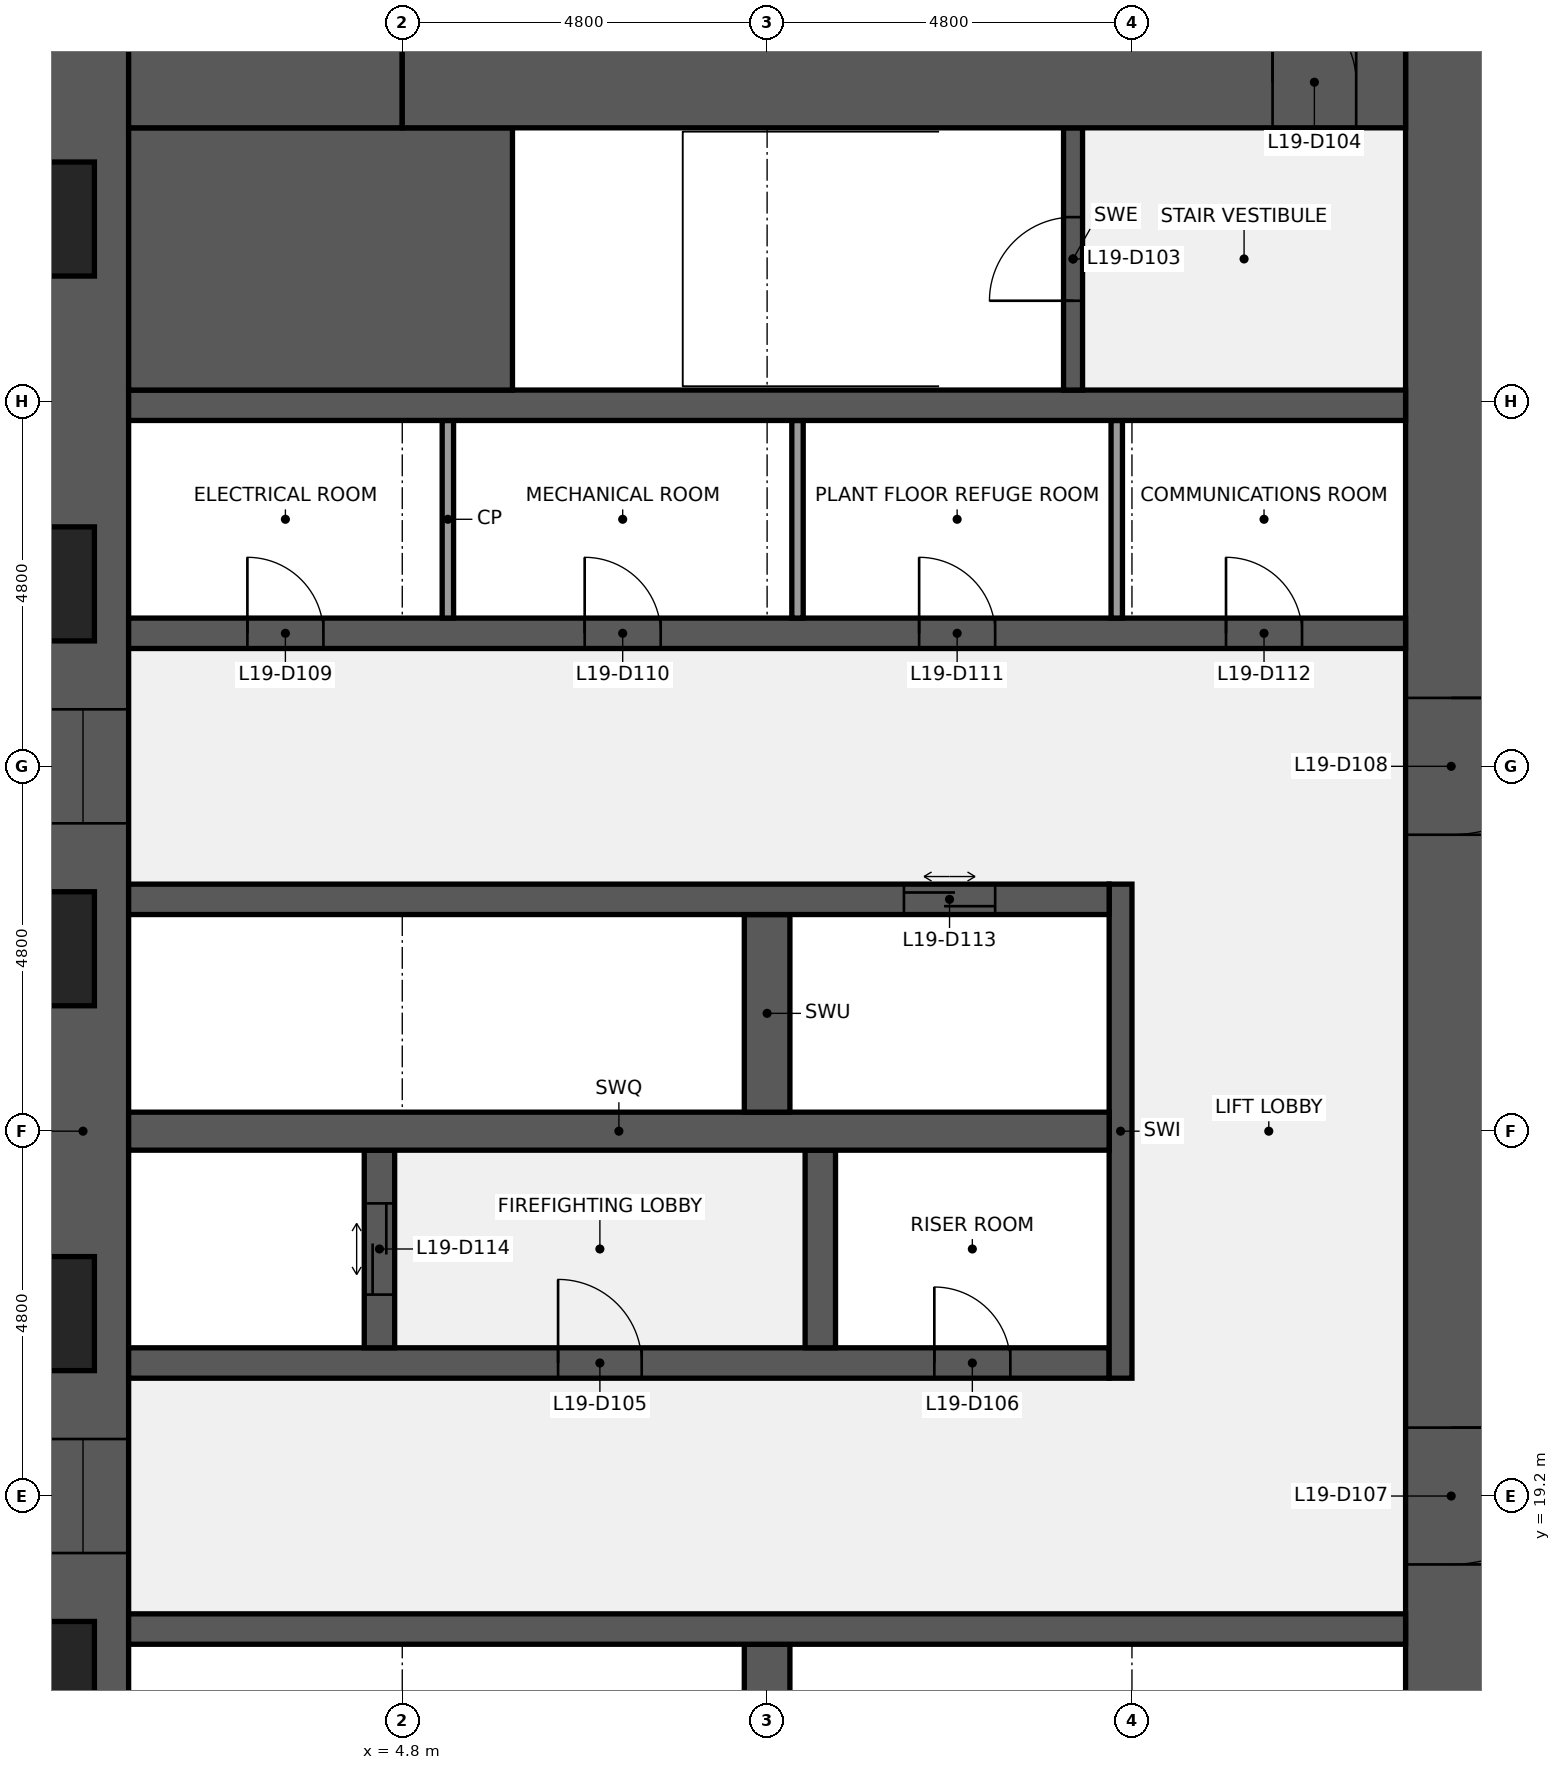
"""IFC4 building model, lengths in metres.
Left out: names, types, materials, properties, quantities, classifications, styles, units other than length and angle.
Written with IfcOpenShell. Run it as: python <this file> out.ifc"""

import sys

from ifc_helpers import new_model, si_unit, direction, frame, frame_2d, origin, place, context, subcontext, project, spatial, rectangle, extrude, element, fill, save


model = new_model("IFC4")
c1 = context("Model", 3, precision=1e-05, world=origin(), true_north=direction((0.0, 1.0)))
c2 = subcontext(c1, "Body", "Model", "MODEL_VIEW")
j1 = project(units=[si_unit("LENGTHUNIT", "METRE"), si_unit("PLANEANGLEUNIT", "RADIAN")], contexts=[c1])
p1 = place(None, origin())
s1 = spatial("IfcSite", under=j1, at=p1, CompositionType="ELEMENT")
p2 = place(p1, origin())
s2 = spatial("IfcBuilding", under=s1, at=p2, CompositionType="ELEMENT")
p3 = place(p2, frame((0.0, 0.0, 87.0)))
s3 = spatial("IfcBuildingStorey", under=s2, at=p3, CompositionType="ELEMENT", Elevation=87.0)
p4 = place(p3, frame((0.6, 9.6, 0.0), z_axis=(0.0, 0.0, 1.0), x_axis=(0.0, 1.0, 0.0)))
e1 = element("IfcWall", 1, at=p4, inside=s3, PredefinedType="SHEAR", context=c2, shape_type="SweptSolid", body=[
    extrude(rectangle(XDim=28.8, YDim=1.2, at=frame_2d((14.4, 0.0))), origin(), (0.0, 0.0, 1.0), 4.1),
])
p5 = place(p4, frame((8.85, 0.0, 0.9)))
e2 = element("IfcOpeningElement", 2, at=p5, cuts=e1, PredefinedType="OPENING", context=c2, shape_type="SweptSolid", body=[
    extrude(rectangle(XDim=1.5, YDim=1.5, at=frame_2d((0.75, 0.75))), frame((0.0, 0.61, 0.0), z_axis=(0.0, -1.0, 0.0), x_axis=(1.0, 0.0, 0.0)), (0.0, 0.0, 1.0), 1.22),
])
p6 = place(p4, frame((18.45, 0.0, 0.9)))
e3 = element("IfcOpeningElement", 3, at=p6, cuts=e1, PredefinedType="OPENING", context=c2, shape_type="SweptSolid", body=[
    extrude(rectangle(XDim=1.5, YDim=1.5, at=frame_2d((0.75, 0.75))), frame((0.0, 0.61, 0.0), z_axis=(0.0, -1.0, 0.0), x_axis=(1.0, 0.0, 0.0)), (0.0, 0.0, 1.0), 1.22),
])
p7 = place(p3, frame((18.6, 38.4, 0.0), z_axis=(0.0, 0.0, 1.0), x_axis=(0.0, -1.0, 0.0)))
e4 = element("IfcWall", 4, at=p7, inside=s3, PredefinedType="SHEAR", context=c2, shape_type="SweptSolid", body=[
    extrude(rectangle(XDim=28.8, YDim=1.2, at=frame_2d((14.4, 0.0))), origin(), (0.0, 0.0, 1.0), 4.1),
])
p8 = place(p7, frame((18.3, 0.0, 0.0)))
e5 = element("IfcOpeningElement", 5, at=p8, cuts=e4, PredefinedType="OPENING", context=c2, shape_type="SweptSolid", body=[
    extrude(rectangle(XDim=1.8, YDim=2.1, at=frame_2d((0.9, 1.05))), frame((0.0, 0.61, 0.0), z_axis=(0.0, -1.0, 0.0), x_axis=(1.0, 0.0, 0.0)), (0.0, 0.0, 1.0), 1.22),
])
p9 = place(p7, frame((8.7, 0.0, 0.0)))
e6 = element("IfcOpeningElement", 6, at=p9, cuts=e4, PredefinedType="OPENING", context=c2, shape_type="SweptSolid", body=[
    extrude(rectangle(XDim=1.8, YDim=2.1, at=frame_2d((0.9, 1.05))), frame((0.0, 0.61, 0.0), z_axis=(0.0, -1.0, 0.0), x_axis=(1.0, 0.0, 0.0)), (0.0, 0.0, 1.0), 1.22),
])
p10 = place(p3, frame((9.6, 14.65, 0.0), z_axis=(0.0, 0.0, 1.0), x_axis=(0.0, 1.0, 0.0)))
e7 = element("IfcWall", 7, at=p10, inside=s3, PredefinedType="SHEAR", context=c2, shape_type="SweptSolid", body=[
    extrude(rectangle(XDim=2.6, YDim=0.6, at=frame_2d((1.3, 0.0))), origin(), (0.0, 0.0, 1.0), 4.1),
])
p11 = place(p3, frame((1.2, 17.45, 0.0), z_axis=(0.0, 0.0, 1.0), x_axis=(1.0, 0.0, 0.0)))
e8 = element("IfcWall", 8, at=p11, inside=s3, PredefinedType="SHEAR", context=c2, shape_type="SweptSolid", body=[
    extrude(rectangle(XDim=16.8, YDim=0.4, at=frame_2d((8.4, 0.0))), origin(), (0.0, 0.0, 1.0), 4.1),
])
p12 = place(p3, frame((1.2, 20.95, 0.0), z_axis=(0.0, 0.0, 1.0), x_axis=(1.0, 0.0, 0.0)))
e9 = element("IfcWall", 9, at=p12, inside=s3, PredefinedType="SHEAR", context=c2, shape_type="SweptSolid", body=[
    extrude(rectangle(XDim=12.9, YDim=0.4, at=frame_2d((6.45, 0.0))), origin(), (0.0, 0.0, 1.0), 4.1),
])
p13 = place(p12, frame((5.65, 0.0, 0.0)))
e10 = element("IfcOpeningElement", 10, at=p13, cuts=e9, PredefinedType="OPENING", context=c2, shape_type="SweptSolid", body=[
    extrude(rectangle(XDim=1.1, YDim=2.1, at=frame_2d((0.55, 1.05))), frame((0.0, 0.21, 0.0), z_axis=(0.0, -1.0, 0.0), x_axis=(1.0, 0.0, 0.0)), (0.0, 0.0, 1.0), 0.42),
])
p14 = place(p12, frame((10.6, 0.0, 0.0)))
e11 = element("IfcOpeningElement", 11, at=p14, cuts=e9, PredefinedType="OPENING", context=c2, shape_type="SweptSolid", body=[
    extrude(rectangle(XDim=1.0, YDim=2.1, at=frame_2d((0.5, 1.05))), frame((0.0, 0.21, 0.0), z_axis=(0.0, -1.0, 0.0), x_axis=(1.0, 0.0, 0.0)), (0.0, 0.0, 1.0), 0.42),
])
p15 = place(p3, frame((14.25, 20.75, 0.0), z_axis=(0.0, 0.0, 1.0), x_axis=(0.0, 1.0, 0.0)))
e12 = element("IfcWall", 12, at=p15, inside=s3, PredefinedType="SHEAR", context=c2, shape_type="SweptSolid", body=[
    extrude(rectangle(XDim=6.5, YDim=0.3, at=frame_2d((3.25, 0.0))), origin(), (0.0, 0.0, 1.0), 4.1),
])
p16 = place(p3, frame((4.5, 21.15, 0.0), z_axis=(0.0, 0.0, 1.0), x_axis=(0.0, 1.0, 0.0)))
e13 = element("IfcWall", 13, at=p16, inside=s3, PredefinedType="SHEAR", context=c2, shape_type="SweptSolid", body=[
    extrude(rectangle(XDim=2.6, YDim=0.4, at=frame_2d((1.3, 0.0))), origin(), (0.0, 0.0, 1.0), 4.1),
])
p17 = place(p16, frame((0.7, 0.0, 0.0)))
e14 = element("IfcOpeningElement", 14, at=p17, cuts=e13, PredefinedType="OPENING", context=c2, shape_type="SweptSolid", body=[
    extrude(rectangle(XDim=1.2, YDim=2.1, at=frame_2d((0.6, 1.05))), frame((0.0, 0.21, 0.0), z_axis=(0.0, -1.0, 0.0), x_axis=(1.0, 0.0, 0.0)), (0.0, 0.0, 1.0), 0.42),
])
p18 = place(p3, frame((10.3, 21.15, 0.0), z_axis=(0.0, 0.0, 1.0), x_axis=(0.0, 1.0, 0.0)))
e15 = element("IfcWall", 15, at=p18, inside=s3, PredefinedType="SHEAR", context=c2, shape_type="SweptSolid", body=[
    extrude(rectangle(XDim=2.6, YDim=0.4, at=frame_2d((1.3, 0.0))), origin(), (0.0, 0.0, 1.0), 4.1),
])
p19 = place(p3, frame((1.2, 24.0, 0.0), z_axis=(0.0, 0.0, 1.0), x_axis=(1.0, 0.0, 0.0)))
e16 = element("IfcWall", 16, at=p19, inside=s3, PredefinedType="SHEAR", context=c2, shape_type="SweptSolid", body=[
    extrude(rectangle(XDim=12.9, YDim=0.5, at=frame_2d((6.45, 0.0))), origin(), (0.0, 0.0, 1.0), 4.1),
])
p20 = place(p3, frame((9.6, 24.25, 0.0), z_axis=(0.0, 0.0, 1.0), x_axis=(0.0, 1.0, 0.0)))
e17 = element("IfcWall", 17, at=p20, inside=s3, PredefinedType="SHEAR", context=c2, shape_type="SweptSolid", body=[
    extrude(rectangle(XDim=2.6, YDim=0.6, at=frame_2d((1.3, 0.0))), origin(), (0.0, 0.0, 1.0), 4.1),
])
p21 = place(p3, frame((1.2, 27.05, 0.0), z_axis=(0.0, 0.0, 1.0), x_axis=(1.0, 0.0, 0.0)))
e18 = element("IfcWall", 18, at=p21, inside=s3, PredefinedType="SHEAR", context=c2, shape_type="SweptSolid", body=[
    extrude(rectangle(XDim=12.9, YDim=0.4, at=frame_2d((6.45, 0.0))), origin(), (0.0, 0.0, 1.0), 4.1),
])
p22 = place(p21, frame((10.2, 0.0, 0.0)))
e19 = element("IfcOpeningElement", 19, at=p22, cuts=e18, PredefinedType="OPENING", context=c2, shape_type="SweptSolid", body=[
    extrude(rectangle(XDim=1.2, YDim=2.1, at=frame_2d((0.6, 1.05))), frame((0.0, 0.21, 0.0), z_axis=(0.0, -1.0, 0.0), x_axis=(1.0, 0.0, 0.0)), (0.0, 0.0, 1.0), 0.42),
])
p23 = place(p3, frame((1.2, 30.55, 0.0), z_axis=(0.0, 0.0, 1.0), x_axis=(1.0, 0.0, 0.0)))
e20 = element("IfcWall", 20, at=p23, inside=s3, PredefinedType="SHEAR", context=c2, shape_type="SweptSolid", body=[
    extrude(rectangle(XDim=16.8, YDim=0.4, at=frame_2d((8.4, 0.0))), origin(), (0.0, 0.0, 1.0), 4.1),
])
p24 = place(p23, frame((1.562, 0.0, 0.0)))
e21 = element("IfcOpeningElement", 21, at=p24, cuts=e20, PredefinedType="OPENING", context=c2, shape_type="SweptSolid", body=[
    extrude(rectangle(XDim=1.0, YDim=2.1, at=frame_2d((0.5, 1.05))), frame((0.0, 0.21, 0.0), z_axis=(0.0, -1.0, 0.0), x_axis=(1.0, 0.0, 0.0)), (0.0, 0.0, 1.0), 0.42),
])
p25 = place(p23, frame((6.0, 0.0, 0.0)))
e22 = element("IfcOpeningElement", 22, at=p25, cuts=e20, PredefinedType="OPENING", context=c2, shape_type="SweptSolid", body=[
    extrude(rectangle(XDim=1.0, YDim=2.1, at=frame_2d((0.5, 1.05))), frame((0.0, 0.21, 0.0), z_axis=(0.0, -1.0, 0.0), x_axis=(1.0, 0.0, 0.0)), (0.0, 0.0, 1.0), 0.42),
])
p26 = place(p23, frame((10.4, 0.0, 0.0)))
e23 = element("IfcOpeningElement", 23, at=p26, cuts=e20, PredefinedType="OPENING", context=c2, shape_type="SweptSolid", body=[
    extrude(rectangle(XDim=1.0, YDim=2.1, at=frame_2d((0.5, 1.05))), frame((0.0, 0.21, 0.0), z_axis=(0.0, -1.0, 0.0), x_axis=(1.0, 0.0, 0.0)), (0.0, 0.0, 1.0), 0.42),
])
p27 = place(p23, frame((14.438, 0.0, 0.0)))
e24 = element("IfcOpeningElement", 24, at=p27, cuts=e20, PredefinedType="OPENING", context=c2, shape_type="SweptSolid", body=[
    extrude(rectangle(XDim=1.0, YDim=2.1, at=frame_2d((0.5, 1.05))), frame((0.0, 0.21, 0.0), z_axis=(0.0, -1.0, 0.0), x_axis=(1.0, 0.0, 0.0)), (0.0, 0.0, 1.0), 0.42),
])
for number, where, z_axis, x_axis in (
    (25, (5.4, 30.75, 0.0), (0.0, 0.0, 1.0), (0.0, 1.0, 0.0)),
    (26, (10.0, 30.75, 0.0), (0.0, 0.0, 1.0), (0.0, 1.0, 0.0)),
    (27, (14.2, 30.75, 0.0), (0.0, 0.0, 1.0), (0.0, 1.0, 0.0)),
):
    element("IfcWall", number, at=place(p3, frame(where, z_axis=z_axis, x_axis=x_axis)), inside=s3, PredefinedType="PARTITIONING", context=c2, shape_type="SweptSolid", body=[
        extrude(rectangle(XDim=2.6, YDim=0.15, at=frame_2d((1.3, 0.0))), origin(), (0.0, 0.0, 1.0), 4.1),
    ])
p28 = place(p3, frame((1.2, 33.55, 0.0), z_axis=(0.0, 0.0, 1.0), x_axis=(1.0, 0.0, 0.0)))
e28 = element("IfcWall", 28, at=p28, inside=s3, PredefinedType="SHEAR", context=c2, shape_type="SweptSolid", body=[
    extrude(rectangle(XDim=16.8, YDim=0.4, at=frame_2d((8.4, 0.0))), origin(), (0.0, 0.0, 1.0), 4.1),
])
p29 = place(p3, frame((1.2, 35.475, 0.0), z_axis=(0.0, 0.0, 1.0), x_axis=(1.0, 0.0, 0.0)))
e29 = element("IfcWall", 29, at=p29, inside=s3, PredefinedType="SHEAR", context=c2, shape_type="SweptSolid", body=[
    extrude(rectangle(XDim=5.05, YDim=3.45, at=frame_2d((2.525, 0.0))), origin(), (0.0, 0.0, 1.0), 4.1),
])
p30 = place(p3, frame((13.625, 33.75, 0.0), z_axis=(0.0, 0.0, 1.0), x_axis=(0.0, 1.0, 0.0)))
e30 = element("IfcWall", 30, at=p30, inside=s3, PredefinedType="SHEAR", context=c2, shape_type="SweptSolid", body=[
    extrude(rectangle(XDim=3.45, YDim=0.25, at=frame_2d((1.725, 0.0))), origin(), (0.0, 0.0, 1.0), 4.1),
])
p31 = place(p30, frame((1.175, 0.0, 0.0)))
e31 = element("IfcOpeningElement", 31, at=p31, cuts=e30, PredefinedType="OPENING", context=c2, shape_type="SweptSolid", body=[
    extrude(rectangle(XDim=1.1, YDim=2.1, at=frame_2d((0.55, 1.05))), frame((0.0, 0.135, 0.0), z_axis=(0.0, -1.0, 0.0), x_axis=(1.0, 0.0, 0.0)), (0.0, 0.0, 1.0), 0.27),
])
p32 = place(p3, frame((1.2, 37.8, 0.0), z_axis=(0.0, 0.0, 1.0), x_axis=(1.0, 0.0, 0.0)))
e32 = element("IfcWall", 32, at=p32, inside=s3, PredefinedType="SHEAR", context=c2, shape_type="SweptSolid", body=[
    extrude(rectangle(XDim=3.6, YDim=1.2, at=frame_2d((1.8, 0.0))), origin(), (0.0, 0.0, 1.0), 4.1),
])
p33 = place(p3, frame((4.8, 37.8, 0.0), z_axis=(0.0, 0.0, 1.0), x_axis=(1.0, 0.0, 0.0)))
e33 = element("IfcWall", 33, at=p33, inside=s3, PredefinedType="SHEAR", context=c2, shape_type="SweptSolid", body=[
    extrude(rectangle(XDim=13.2, YDim=1.2, at=frame_2d((6.6, 0.0))), origin(), (0.0, 0.0, 1.0), 4.1),
])
p34 = place(p33, frame((11.45, 0.0, 0.0)))
e34 = element("IfcOpeningElement", 34, at=p34, cuts=e33, PredefinedType="OPENING", context=c2, shape_type="SweptSolid", body=[
    extrude(rectangle(XDim=1.1, YDim=2.1, at=frame_2d((0.55, 1.05))), frame((0.0, 0.61, 0.0), z_axis=(0.0, -1.0, 0.0), x_axis=(1.0, 0.0, 0.0)), (0.0, 0.0, 1.0), 1.22),
])
p35 = place(p31, origin())
e35 = element("IfcDoor", 35, at=p35, inside=s3, OperationType="SINGLE_SWING_LEFT", PredefinedType="DOOR", context=c2, shape_type="SweptSolid", body=[
    extrude(rectangle(XDim=1.1, YDim=2.1, at=frame_2d((0.55, 1.05))), frame((0.0, 0.025, 0.0), z_axis=(0.0, -1.0, 0.0), x_axis=(1.0, 0.0, 0.0)), (0.0, 0.0, 1.0), 0.05),
])
fill(e31, e35)
p36 = place(p34, origin())
e36 = element("IfcDoor", 36, at=p36, inside=s3, OperationType="SINGLE_SWING_LEFT", PredefinedType="DOOR", context=c2, shape_type="SweptSolid", body=[
    extrude(rectangle(XDim=1.1, YDim=2.1, at=frame_2d((0.55, 1.05))), frame((0.0, 0.025, 0.0), z_axis=(0.0, -1.0, 0.0), x_axis=(1.0, 0.0, 0.0)), (0.0, 0.0, 1.0), 0.05),
])
fill(e34, e36)
p37 = place(p13, origin())
e37 = element("IfcDoor", 37, at=p37, inside=s3, OperationType="SINGLE_SWING_LEFT", PredefinedType="DOOR", context=c2, shape_type="SweptSolid", body=[
    extrude(rectangle(XDim=1.1, YDim=2.1, at=frame_2d((0.55, 1.05))), frame((0.0, 0.025, 0.0), z_axis=(0.0, -1.0, 0.0), x_axis=(1.0, 0.0, 0.0)), (0.0, 0.0, 1.0), 0.05),
])
fill(e10, e37)
p38 = place(p14, origin())
e38 = element("IfcDoor", 38, at=p38, inside=s3, OperationType="SINGLE_SWING_LEFT", PredefinedType="DOOR", context=c2, shape_type="SweptSolid", body=[
    extrude(rectangle(XDim=1.0, YDim=2.1, at=frame_2d((0.5, 1.05))), frame((0.0, 0.025, 0.0), z_axis=(0.0, -1.0, 0.0), x_axis=(1.0, 0.0, 0.0)), (0.0, 0.0, 1.0), 0.05),
])
fill(e11, e38)
p39 = place(p8, origin())
e39 = element("IfcDoor", 39, at=p39, inside=s3, OperationType="DOUBLE_DOOR_SINGLE_SWING", PredefinedType="DOOR", context=c2, shape_type="SweptSolid", body=[
    extrude(rectangle(XDim=1.8, YDim=2.1, at=frame_2d((0.9, 1.05))), frame((0.0, 0.025, 0.0), z_axis=(0.0, -1.0, 0.0), x_axis=(1.0, 0.0, 0.0)), (0.0, 0.0, 1.0), 0.05),
])
fill(e5, e39)
p40 = place(p9, origin())
e40 = element("IfcDoor", 40, at=p40, inside=s3, OperationType="DOUBLE_DOOR_SINGLE_SWING", PredefinedType="DOOR", context=c2, shape_type="SweptSolid", body=[
    extrude(rectangle(XDim=1.8, YDim=2.1, at=frame_2d((0.9, 1.05))), frame((0.0, 0.025, 0.0), z_axis=(0.0, -1.0, 0.0), x_axis=(1.0, 0.0, 0.0)), (0.0, 0.0, 1.0), 0.05),
])
fill(e6, e40)
p41 = place(p24, origin())
e41 = element("IfcDoor", 41, at=p41, inside=s3, OperationType="SINGLE_SWING_LEFT", PredefinedType="DOOR", context=c2, shape_type="SweptSolid", body=[
    extrude(rectangle(XDim=1.0, YDim=2.1, at=frame_2d((0.5, 1.05))), frame((0.0, 0.025, 0.0), z_axis=(0.0, -1.0, 0.0), x_axis=(1.0, 0.0, 0.0)), (0.0, 0.0, 1.0), 0.05),
])
fill(e21, e41)
p42 = place(p25, origin())
e42 = element("IfcDoor", 42, at=p42, inside=s3, OperationType="SINGLE_SWING_LEFT", PredefinedType="DOOR", context=c2, shape_type="SweptSolid", body=[
    extrude(rectangle(XDim=1.0, YDim=2.1, at=frame_2d((0.5, 1.05))), frame((0.0, 0.025, 0.0), z_axis=(0.0, -1.0, 0.0), x_axis=(1.0, 0.0, 0.0)), (0.0, 0.0, 1.0), 0.05),
])
fill(e22, e42)
p43 = place(p26, origin())
e43 = element("IfcDoor", 43, at=p43, inside=s3, OperationType="SINGLE_SWING_LEFT", PredefinedType="DOOR", context=c2, shape_type="SweptSolid", body=[
    extrude(rectangle(XDim=1.0, YDim=2.1, at=frame_2d((0.5, 1.05))), frame((0.0, 0.025, 0.0), z_axis=(0.0, -1.0, 0.0), x_axis=(1.0, 0.0, 0.0)), (0.0, 0.0, 1.0), 0.05),
])
fill(e23, e43)
p44 = place(p27, origin())
e44 = element("IfcDoor", 44, at=p44, inside=s3, OperationType="SINGLE_SWING_LEFT", PredefinedType="DOOR", context=c2, shape_type="SweptSolid", body=[
    extrude(rectangle(XDim=1.0, YDim=2.1, at=frame_2d((0.5, 1.05))), frame((0.0, 0.025, 0.0), z_axis=(0.0, -1.0, 0.0), x_axis=(1.0, 0.0, 0.0)), (0.0, 0.0, 1.0), 0.05),
])
fill(e24, e44)
p45 = place(p22, origin())
e45 = element("IfcDoor", 45, at=p45, inside=s3, OperationType="DOUBLE_DOOR_SLIDING", PredefinedType="DOOR", context=c2, shape_type="SweptSolid", body=[
    extrude(rectangle(XDim=1.2, YDim=2.1, at=frame_2d((0.6, 1.05))), frame((0.0, 0.025, 0.0), z_axis=(0.0, -1.0, 0.0), x_axis=(1.0, 0.0, 0.0)), (0.0, 0.0, 1.0), 0.05),
])
fill(e19, e45)
p46 = place(p17, origin())
e46 = element("IfcDoor", 46, at=p46, inside=s3, OperationType="DOUBLE_DOOR_SLIDING", PredefinedType="DOOR", context=c2, shape_type="SweptSolid", body=[
    extrude(rectangle(XDim=1.2, YDim=2.1, at=frame_2d((0.6, 1.05))), frame((0.0, 0.025, 0.0), z_axis=(0.0, -1.0, 0.0), x_axis=(1.0, 0.0, 0.0)), (0.0, 0.0, 1.0), 0.05),
])
fill(e14, e46)
p47 = place(p5, origin())
e47 = element("IfcWindow", 47, at=p47, inside=s3, PartitioningType="SINGLE_PANEL", PredefinedType="WINDOW", context=c2, shape_type="SweptSolid", body=[
    extrude(rectangle(XDim=1.5, YDim=1.5, at=frame_2d((0.75, 0.75))), frame((0.0, 0.03, 0.0), z_axis=(0.0, -1.0, 0.0), x_axis=(1.0, 0.0, 0.0)), (0.0, 0.0, 1.0), 0.06),
])
fill(e2, e47)
p48 = place(p6, origin())
e48 = element("IfcWindow", 48, at=p48, inside=s3, PartitioningType="SINGLE_PANEL", PredefinedType="WINDOW", context=c2, shape_type="SweptSolid", body=[
    extrude(rectangle(XDim=1.5, YDim=1.5, at=frame_2d((0.75, 0.75))), frame((0.0, 0.03, 0.0), z_axis=(0.0, -1.0, 0.0), x_axis=(1.0, 0.0, 0.0)), (0.0, 0.0, 1.0), 0.06),
])
fill(e3, e48)
save(model, sys.argv[1])
